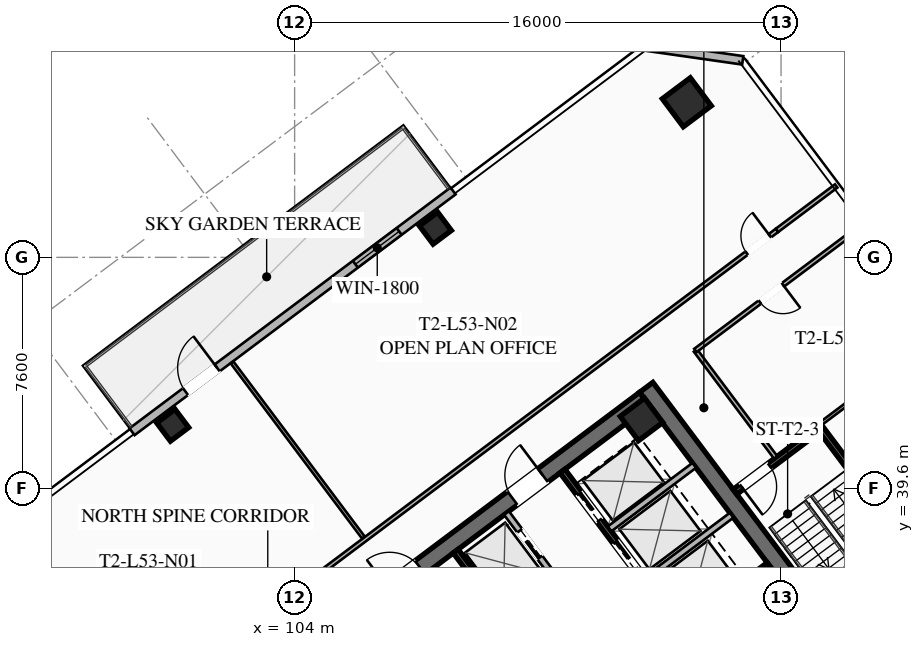
"""IFC4 building model, lengths in metres.
Left out: names, types, materials, properties, quantities, classifications, styles, units other than length and angle.
Written with IfcOpenShell. Run it as: python <this file> out.ifc"""

import sys

from ifc_helpers import new_model, si_unit, direction, frame, frame_2d, origin, origin_2d, place, context, subcontext, project, spatial, rectangle, hollow_rectangle, extrude, element, fill, save


model = new_model("IFC4")
c1 = context("Model", 3, precision=1e-05, world=origin(), true_north=direction((0.0, 1.0)))
c2 = subcontext(c1, "Body", "Model", "MODEL_VIEW")
j1 = project(units=[si_unit("LENGTHUNIT", "METRE"), si_unit("PLANEANGLEUNIT", "RADIAN")], contexts=[c1])
p1 = place(None, origin())
s1 = spatial("IfcSite", under=j1, at=p1, CompositionType="ELEMENT")
p2 = place(p1, origin())
s2 = spatial("IfcBuilding", under=s1, at=p2, CompositionType="ELEMENT")
p3 = place(p2, frame((0.0, 0.0, 196.05)))
s3 = spatial("IfcBuildingStorey", under=s2, at=p3, CompositionType="ELEMENT", Elevation=196.05)
p4 = place(p3, frame((115.564, 42.923, 0.0), z_axis=(0.0, 0.0, 1.0), x_axis=(0.600005007985, -0.799996243986, 0.0)))
e1 = element("IfcWall", 1, at=p4, inside=s3, PredefinedType="SHEAR", context=c2, shape_type="SweptSolid", body=[
    extrude(rectangle(XDim=15.6, YDim=0.55, at=frame_2d((7.8, 0.0))), origin(), (0.0, 0.0, 1.0), 3.55),
])
p5 = place(p3, frame((103.461, 33.502, 0.0), z_axis=(0.0, 0.0, 1.0), x_axis=(0.799998054672, 0.600002593761, 0.0)))
e2 = element("IfcWall", 2, at=p5, inside=s3, PredefinedType="SHEAR", context=c2, shape_type="SweptSolid", body=[
    extrude(rectangle(XDim=15.06, YDim=0.55, at=frame_2d((7.53, 0.0))), origin(), (0.0, 0.0, 1.0), 3.55),
])
p6 = place(p5, frame((4.58, 0.0, 0.0)))
e3 = element("IfcOpeningElement", 3, at=p6, cuts=e2, PredefinedType="OPENING", context=c2, shape_type="SweptSolid", body=[
    extrude(rectangle(XDim=1.25, YDim=2.25, at=frame_2d((0.625, 1.125))), frame((0.0, 0.285, 0.0), z_axis=(0.0, -1.0, 0.0), x_axis=(1.0, 0.0, 0.0)), (0.0, 0.0, 1.0), 0.57),
])
p7 = place(p5, frame((9.63, 0.0, 0.0)))
e4 = element("IfcOpeningElement", 4, at=p7, cuts=e2, PredefinedType="OPENING", context=c2, shape_type="SweptSolid", body=[
    extrude(rectangle(XDim=1.25, YDim=2.25, at=frame_2d((0.625, 1.125))), frame((0.0, 0.285, 0.0), z_axis=(0.0, -1.0, 0.0), x_axis=(1.0, 0.0, 0.0)), (0.0, 0.0, 1.0), 0.57),
])
p8 = place(p3, frame((115.41, 41.87, 0.0), z_axis=(0.0, 0.0, 1.0), x_axis=(0.799999996291, 0.600000004945, 0.0)))
e5 = element("IfcColumn", 5, at=p8, inside=s3, PredefinedType="COLUMN", context=c2, shape_type="SweptSolid", body=[
    extrude(hollow_rectangle(XDim=1.0, YDim=1.0, WallThickness=0.04, at=origin_2d()), origin(), (0.0, 0.0, 1.0), 3.25),
])
p9 = place(p3, frame((116.9, 52.3, 0.0), z_axis=(0.0, 0.0, 1.0), x_axis=(0.799999996291, 0.600000004945, 0.0)))
e6 = element("IfcColumn", 6, at=p9, inside=s3, PredefinedType="COLUMN", context=c2, shape_type="SweptSolid", body=[
    extrude(hollow_rectangle(XDim=1.15, YDim=1.15, WallThickness=0.045, at=origin_2d()), origin(), (0.0, 0.0, 1.0), 3.25),
])
for number, where, z_axis, x_axis in (
    (7, (108.63, 48.16, 0.0), (0.0, 0.0, 1.0), (0.8, 0.6, 0.0)),
    (8, (99.99, 41.68, 0.0), (0.0, 0.0, 1.0), (0.8, 0.6, 0.0)),
):
    element("IfcColumn", number, at=place(p3, frame(where, z_axis=z_axis, x_axis=x_axis)), inside=s3, PredefinedType="COLUMN", context=c2, shape_type="SweptSolid", body=[
        extrude(hollow_rectangle(XDim=0.75, YDim=0.75, WallThickness=0.032, at=origin_2d()), origin(), (0.0, 0.0, 1.0), 3.25),
    ])
p10 = place(p3, frame((98.652, 41.464, 0.0), z_axis=(0.0, 0.0, 1.0), x_axis=(0.799997780501, 0.60000295932, 0.0)))
e9 = element("IfcWall", 9, at=p10, inside=s3, PredefinedType="SOLIDWALL", context=c2, shape_type="SweptSolid", body=[
    extrude(rectangle(XDim=13.2, YDim=0.28, at=frame_2d((6.6, 0.0))), origin(), (0.0, 0.0, 1.0), 3.25),
])
p11 = place(p10, frame((2.2, 0.0, 0.0)))
e10 = element("IfcOpeningElement", 10, at=p11, cuts=e9, PredefinedType="OPENING", context=c2, shape_type="SweptSolid", body=[
    extrude(rectangle(XDim=1.3, YDim=2.15, at=frame_2d((0.65, 1.075))), frame((0.0, 0.15, 0.0), z_axis=(0.0, -1.0, 0.0), x_axis=(1.0, 0.0, 0.0)), (0.0, 0.0, 1.0), 0.3),
])
p12 = place(p10, frame((9.182, 0.0, 0.85)))
e11 = element("IfcOpeningElement", 11, at=p12, cuts=e9, PredefinedType="OPENING", context=c2, shape_type="SweptSolid", body=[
    extrude(rectangle(XDim=1.8, YDim=1.92, at=frame_2d((0.9, 0.96))), frame((0.0, 0.15, 0.0), z_axis=(0.0, -1.0, 0.0), x_axis=(1.0, 0.0, 0.0)), (0.0, 0.0, 1.0), 0.3),
])
p13 = place(p3, frame((115.52, 54.14, 0.0), z_axis=(0.0, 0.0, 1.0), x_axis=(0.989950994782, -0.141410847992, 0.0)))
e12 = element("IfcWall", 12, at=p13, inside=s3, PredefinedType="SOLIDWALL", context=c2, shape_type="SweptSolid", body=[
    extrude(rectangle(XDim=3.253, YDim=0.28, at=frame_2d((1.626, 0.0))), origin(), (0.0, 0.0, 1.0), 3.25),
])
p14 = place(p3, frame((116.54, 34.78, 0.0), z_axis=(0.0, 0.0, 1.0), x_axis=(0.800015298837, 0.599979601008, 0.0)))
e13 = element("IfcWall", 13, at=p14, inside=s3, PredefinedType="SHEAR", context=c2, shape_type="SweptSolid", body=[
    extrude(rectangle(XDim=3.83, YDim=0.2, at=frame_2d((1.915, 0.0))), origin(), (0.0, 0.0, 1.0), 3.25),
])
p15 = place(p3, frame((117.998, 25.936, 0.0), z_axis=(0.0, 0.0, 1.0), x_axis=(-0.600002693989, 0.799997979501, 0.0)))
e14 = element("IfcWall", 14, at=p15, inside=s3, PredefinedType="SHEAR", context=c2, shape_type="SweptSolid", body=[
    extrude(rectangle(XDim=14.5, YDim=0.2, at=frame_2d((7.25, 0.0))), origin(), (0.0, 0.0, 1.0), 3.25),
])
p16 = place(p3, frame((112.81, 40.17, 0.0), z_axis=(0.0, 0.0, 1.0), x_axis=(0.599993943644, -0.800004542231, 0.0)))
e15 = element("IfcWall", 15, at=p16, inside=s3, PredefinedType="SHEAR", context=c2, shape_type="SweptSolid", body=[
    extrude(rectangle(XDim=6.45, YDim=0.2, at=frame_2d((3.225, 0.0))), origin(), (0.0, 0.0, 1.0), 3.25),
])
p17 = place(p16, frame((4.975, 0.0, 0.0)))
e16 = element("IfcOpeningElement", 16, at=p17, cuts=e15, PredefinedType="OPENING", context=c2, shape_type="SweptSolid", body=[
    extrude(rectangle(XDim=1.1, YDim=2.2, at=frame_2d((0.55, 1.1))), frame((0.0, 0.11, 0.0), z_axis=(0.0, -1.0, 0.0), x_axis=(1.0, 0.0, 0.0)), (0.0, 0.0, 1.0), 0.22),
])
p18 = place(p16, frame((2.925, 0.0, 0.0)))
e17 = element("IfcOpeningElement", 17, at=p18, cuts=e15, PredefinedType="OPENING", context=c2, shape_type="SweptSolid", body=[
    extrude(rectangle(XDim=1.1, YDim=2.2, at=frame_2d((0.55, 1.1))), frame((0.0, 0.11, 0.0), z_axis=(0.0, -1.0, 0.0), x_axis=(1.0, 0.0, 0.0)), (0.0, 0.0, 1.0), 0.22),
])
p19 = place(p16, frame((0.925, 0.0, 0.0)))
e18 = element("IfcOpeningElement", 18, at=p19, cuts=e15, PredefinedType="OPENING", context=c2, shape_type="SweptSolid", body=[
    extrude(rectangle(XDim=1.1, YDim=2.2, at=frame_2d((0.55, 1.1))), frame((0.0, 0.11, 0.0), z_axis=(0.0, -1.0, 0.0), x_axis=(1.0, 0.0, 0.0)), (0.0, 0.0, 1.0), 0.22),
])
for number, where, z_axis, x_axis in (
    (19, (115.59, 36.63, 0.0), (0.0, 0.0, 1.0), (0.8, 0.6, 0.0)),
    (20, (114.36, 38.27, 0.0), (0.0, 0.0, 1.0), (0.8, 0.6, 0.0)),
):
    element("IfcWall", number, at=place(p3, frame(where, z_axis=z_axis, x_axis=x_axis)), inside=s3, PredefinedType="SOLIDWALL", context=c2, shape_type="SweptSolid", body=[
        extrude(rectangle(XDim=3.48, YDim=0.2, at=frame_2d((1.74, 0.0))), origin(), (0.0, 0.0, 1.0), 3.25),
    ])
p20 = place(p3, frame((115.11, 33.27, 0.0), z_axis=(0.0, 0.0, 1.0), x_axis=(-0.600011322243, 0.799991508192, 0.0)))
e21 = element("IfcWall", 21, at=p20, inside=s3, PredefinedType="SOLIDWALL", context=c2, shape_type="SweptSolid", body=[
    extrude(rectangle(XDim=6.9, YDim=0.2, at=frame_2d((3.45, 0.0))), origin(), (0.0, 0.0, 1.0), 3.25),
])
p21 = place(p20, frame((0.575, 0.0, 0.0)))
e22 = element("IfcOpeningElement", 22, at=p21, cuts=e21, PredefinedType="OPENING", context=c2, shape_type="SweptSolid", body=[
    extrude(rectangle(XDim=1.1, YDim=2.2, at=frame_2d((0.55, 1.1))), frame((0.0, 0.11, 0.0), z_axis=(0.0, -1.0, 0.0), x_axis=(1.0, 0.0, 0.0)), (0.0, 0.0, 1.0), 0.22),
])
p22 = place(p20, frame((2.825, 0.0, 0.0)))
e23 = element("IfcOpeningElement", 23, at=p22, cuts=e21, PredefinedType="OPENING", context=c2, shape_type="SweptSolid", body=[
    extrude(rectangle(XDim=1.1, YDim=2.2, at=frame_2d((0.55, 1.1))), frame((0.0, 0.11, 0.0), z_axis=(0.0, -1.0, 0.0), x_axis=(1.0, 0.0, 0.0)), (0.0, 0.0, 1.0), 0.22),
])
p23 = place(p20, frame((5.075, 0.0, 0.0)))
e24 = element("IfcOpeningElement", 24, at=p23, cuts=e21, PredefinedType="OPENING", context=c2, shape_type="SweptSolid", body=[
    extrude(rectangle(XDim=1.1, YDim=2.2, at=frame_2d((0.55, 1.1))), frame((0.0, 0.11, 0.0), z_axis=(0.0, -1.0, 0.0), x_axis=(1.0, 0.0, 0.0)), (0.0, 0.0, 1.0), 0.22),
])
p24 = place(p3, frame((125.304, 36.228, 0.0), z_axis=(0.0, 0.0, 1.0), x_axis=(-0.59998851072, 0.800008616831, 0.0)))
e25 = element("IfcWall", 25, at=p24, inside=s3, PredefinedType="SHEAR", context=c2, shape_type="SweptSolid", body=[
    extrude(rectangle(XDim=6.8, YDim=0.2, at=frame_2d((3.4, 0.0))), origin(), (0.0, 0.0, 1.0), 3.25),
])
p25 = place(p3, frame((121.204, 41.528, 0.0), z_axis=(0.0, 0.0, 1.0), x_axis=(-0.800017232136, -0.599977023131, 0.0)))
e26 = element("IfcWall", 26, at=p25, inside=s3, PredefinedType="SHEAR", context=c2, shape_type="SweptSolid", body=[
    extrude(rectangle(XDim=3.4, YDim=0.2, at=frame_2d((1.7, 0.0))), origin(), (0.0, 0.0, 1.0), 3.25),
])
p26 = place(p25, frame((1.975, 0.0, 0.0)))
e27 = element("IfcOpeningElement", 27, at=p26, cuts=e26, PredefinedType="OPENING", context=c2, shape_type="SweptSolid", body=[
    extrude(rectangle(XDim=1.15, YDim=2.2, at=frame_2d((0.575, 1.1))), frame((0.0, 0.11, 0.0), z_axis=(0.0, -1.0, 0.0), x_axis=(1.0, 0.0, 0.0)), (0.0, 0.0, 1.0), 0.22),
])
p27 = place(p3, frame((119.824, 40.618, 0.0), z_axis=(0.0, 0.0, 1.0), x_axis=(-0.599982243973, 0.800013316712, 0.0)))
e28 = element("IfcWall", 28, at=p27, inside=s3, PredefinedType="PARTITIONING", context=c2, shape_type="SweptSolid", body=[
    extrude(rectangle(XDim=4.4, YDim=0.135, at=frame_2d((2.2, 0.0))), origin(), (0.0, 0.0, 1.0), 2.393),
])
p28 = place(p3, frame((96.91, 30.87, 0.0), z_axis=(0.0, 0.0, 1.0), x_axis=(0.800003062365, 0.599995916825, 0.0)))
e29 = element("IfcWall", 29, at=p28, inside=s3, PredefinedType="PARTITIONING", context=c2, shape_type="SweptSolid", body=[
    extrude(rectangle(XDim=28.7, YDim=0.135, at=frame_2d((14.35, 0.0))), origin(), (0.0, 0.0, 1.0), 2.393),
])
p29 = place(p28, frame((0.3, 0.0, 0.0)))
e30 = element("IfcOpeningElement", 30, at=p29, cuts=e29, PredefinedType="OPENING", context=c2, shape_type="SweptSolid", body=[
    extrude(rectangle(XDim=0.95, YDim=2.05, at=frame_2d((0.475, 1.025))), frame((0.0, 0.077, 0.0), z_axis=(0.0, -1.0, 0.0), x_axis=(1.0, 0.0, 0.0)), (0.0, 0.0, 1.0), 0.155),
])
p30 = place(p28, frame((27.45, 0.0, 0.0)))
e31 = element("IfcOpeningElement", 31, at=p30, cuts=e29, PredefinedType="OPENING", context=c2, shape_type="SweptSolid", body=[
    extrude(rectangle(XDim=0.95, YDim=2.05, at=frame_2d((0.475, 1.025))), frame((0.0, 0.077, 0.0), z_axis=(0.0, -1.0, 0.0), x_axis=(1.0, 0.0, 0.0)), (0.0, 0.0, 1.0), 0.155),
])
p31 = place(p3, frame((119.87, 48.09, 0.0), z_axis=(0.0, 0.0, 1.0), x_axis=(0.799975885537, 0.600032151272, 0.0)))
e32 = element("IfcWall", 32, at=p31, inside=s3, PredefinedType="PARTITIONING", context=c2, shape_type="SweptSolid", body=[
    extrude(rectangle(XDim=2.43, YDim=0.135, at=frame_2d((1.215, 0.0))), origin(), (0.0, 0.0, 1.0), 2.393),
])
p32 = place(p3, frame((106.262, 37.984, 0.0), z_axis=(0.0, 0.0, 1.0), x_axis=(-0.600005425297, 0.799995930999, 0.0)))
e33 = element("IfcWall", 33, at=p32, inside=s3, PredefinedType="PARTITIONING", context=c2, shape_type="SweptSolid", body=[
    extrude(rectangle(XDim=7.2, YDim=0.11, at=frame_2d((3.6, 0.0))), origin(), (0.0, 0.0, 1.0), 2.393),
])
p33 = place(p3, frame((122.744, 48.308, 0.0), z_axis=(0.0, 0.0, 1.0), x_axis=(-0.79997892247, -0.600028102345, 0.0)))
e34 = element("IfcWall", 34, at=p33, inside=s3, PredefinedType="PARTITIONING", context=c2, shape_type="SweptSolid", body=[
    extrude(rectangle(XDim=6.95, YDim=0.135, at=frame_2d((3.475, 0.0))), origin(), (0.0, 0.0, 1.0), 2.393),
])
p34 = place(p33, frame((3.35, 0.0, 0.0)))
e35 = element("IfcOpeningElement", 35, at=p34, cuts=e34, PredefinedType="OPENING", context=c2, shape_type="SweptSolid", body=[
    extrude(rectangle(XDim=0.95, YDim=2.05, at=frame_2d((0.475, 1.025))), frame((0.0, 0.077, 0.0), z_axis=(0.0, -1.0, 0.0), x_axis=(1.0, 0.0, 0.0)), (0.0, 0.0, 1.0), 0.155),
])
p35 = place(p3, frame((125.384, 44.788, 0.0), z_axis=(0.0, 0.0, 1.0), x_axis=(-0.8, -0.6, 0.0)))
e36 = element("IfcWall", 36, at=p35, inside=s3, PredefinedType="PARTITIONING", context=c2, shape_type="SweptSolid", body=[
    extrude(rectangle(XDim=5.1, YDim=0.11, at=frame_2d((2.55, 0.0))), origin(), (0.0, 0.0, 1.0), 2.393),
])
p36 = place(p11, origin())
e37 = element("IfcDoor", 37, at=p36, inside=s3, OperationType="SINGLE_SWING_RIGHT", PredefinedType="DOOR", context=c2, shape_type="SweptSolid", body=[
    extrude(rectangle(XDim=1.3, YDim=2.15, at=frame_2d((0.65, 1.075))), frame((0.0, 0.025, 0.0), z_axis=(0.0, -1.0, 0.0), x_axis=(1.0, 0.0, 0.0)), (0.0, 0.0, 1.0), 0.05),
])
fill(e10, e37)
p37 = place(p12, origin())
e38 = element("IfcWindow", 38, at=p37, inside=s3, PartitioningType="SINGLE_PANEL", PredefinedType="WINDOW", context=c2, shape_type="SweptSolid", body=[
    extrude(rectangle(XDim=1.8, YDim=1.92, at=frame_2d((0.9, 0.96))), frame((0.0, 0.03, 0.0), z_axis=(0.0, -1.0, 0.0), x_axis=(1.0, 0.0, 0.0)), (0.0, 0.0, 1.0), 0.06),
])
fill(e11, e38)
p38 = place(p7, origin())
e39 = element("IfcDoor", 39, at=p38, inside=s3, OperationType="SINGLE_SWING_RIGHT", PredefinedType="DOOR", context=c2, shape_type="SweptSolid", body=[
    extrude(rectangle(XDim=1.25, YDim=2.25, at=frame_2d((0.625, 1.125))), frame((0.0, 0.025, 0.0), z_axis=(0.0, -1.0, 0.0), x_axis=(1.0, 0.0, 0.0)), (0.0, 0.0, 1.0), 0.05),
])
fill(e4, e39)
p39 = place(p26, origin())
e40 = element("IfcDoor", 40, at=p39, inside=s3, OperationType="SINGLE_SWING_RIGHT", PredefinedType="DOOR", context=c2, shape_type="SweptSolid", body=[
    extrude(rectangle(XDim=1.15, YDim=2.2, at=frame_2d((0.575, 1.1))), frame((0.0, 0.025, 0.0), z_axis=(0.0, -1.0, 0.0), x_axis=(1.0, 0.0, 0.0)), (0.0, 0.0, 1.0), 0.05),
])
fill(e27, e40)
p40 = place(p30, origin())
e41 = element("IfcDoor", 41, at=p40, inside=s3, OperationType="SINGLE_SWING_RIGHT", PredefinedType="DOOR", context=c2, shape_type="SweptSolid", body=[
    extrude(rectangle(XDim=0.95, YDim=2.05, at=frame_2d((0.475, 1.025))), frame((0.0, 0.025, 0.0), z_axis=(0.0, -1.0, 0.0), x_axis=(1.0, 0.0, 0.0)), (0.0, 0.0, 1.0), 0.05),
])
fill(e31, e41)
p41 = place(p34, origin())
e42 = element("IfcDoor", 42, at=p41, inside=s3, OperationType="SINGLE_SWING_LEFT", PredefinedType="DOOR", context=c2, shape_type="SweptSolid", body=[
    extrude(rectangle(XDim=0.95, YDim=2.05, at=frame_2d((0.475, 1.025))), frame((0.0, 0.025, 0.0), z_axis=(0.0, -1.0, 0.0), x_axis=(1.0, 0.0, 0.0)), (0.0, 0.0, 1.0), 0.05),
])
fill(e35, e42)
p42 = place(p23, origin())
e43 = element("IfcDoor", 43, at=p42, inside=s3, OperationType="SLIDING_TO_LEFT", PredefinedType="DOOR", context=c2, shape_type="SweptSolid", body=[
    extrude(rectangle(XDim=1.1, YDim=2.2, at=frame_2d((0.55, 1.1))), frame((0.0, 0.025, 0.0), z_axis=(0.0, -1.0, 0.0), x_axis=(1.0, 0.0, 0.0)), (0.0, 0.0, 1.0), 0.05),
])
fill(e24, e43)
p43 = place(p18, origin())
e44 = element("IfcDoor", 44, at=p43, inside=s3, OperationType="SLIDING_TO_LEFT", PredefinedType="DOOR", context=c2, shape_type="SweptSolid", body=[
    extrude(rectangle(XDim=1.1, YDim=2.2, at=frame_2d((0.55, 1.1))), frame((0.0, 0.025, 0.0), z_axis=(0.0, -1.0, 0.0), x_axis=(1.0, 0.0, 0.0)), (0.0, 0.0, 1.0), 0.05),
])
fill(e17, e44)
p44 = place(p19, origin())
e45 = element("IfcDoor", 45, at=p44, inside=s3, OperationType="SLIDING_TO_LEFT", PredefinedType="DOOR", context=c2, shape_type="SweptSolid", body=[
    extrude(rectangle(XDim=1.1, YDim=2.2, at=frame_2d((0.55, 1.1))), frame((0.0, 0.025, 0.0), z_axis=(0.0, -1.0, 0.0), x_axis=(1.0, 0.0, 0.0)), (0.0, 0.0, 1.0), 0.05),
])
fill(e18, e45)
save(model, sys.argv[1])
